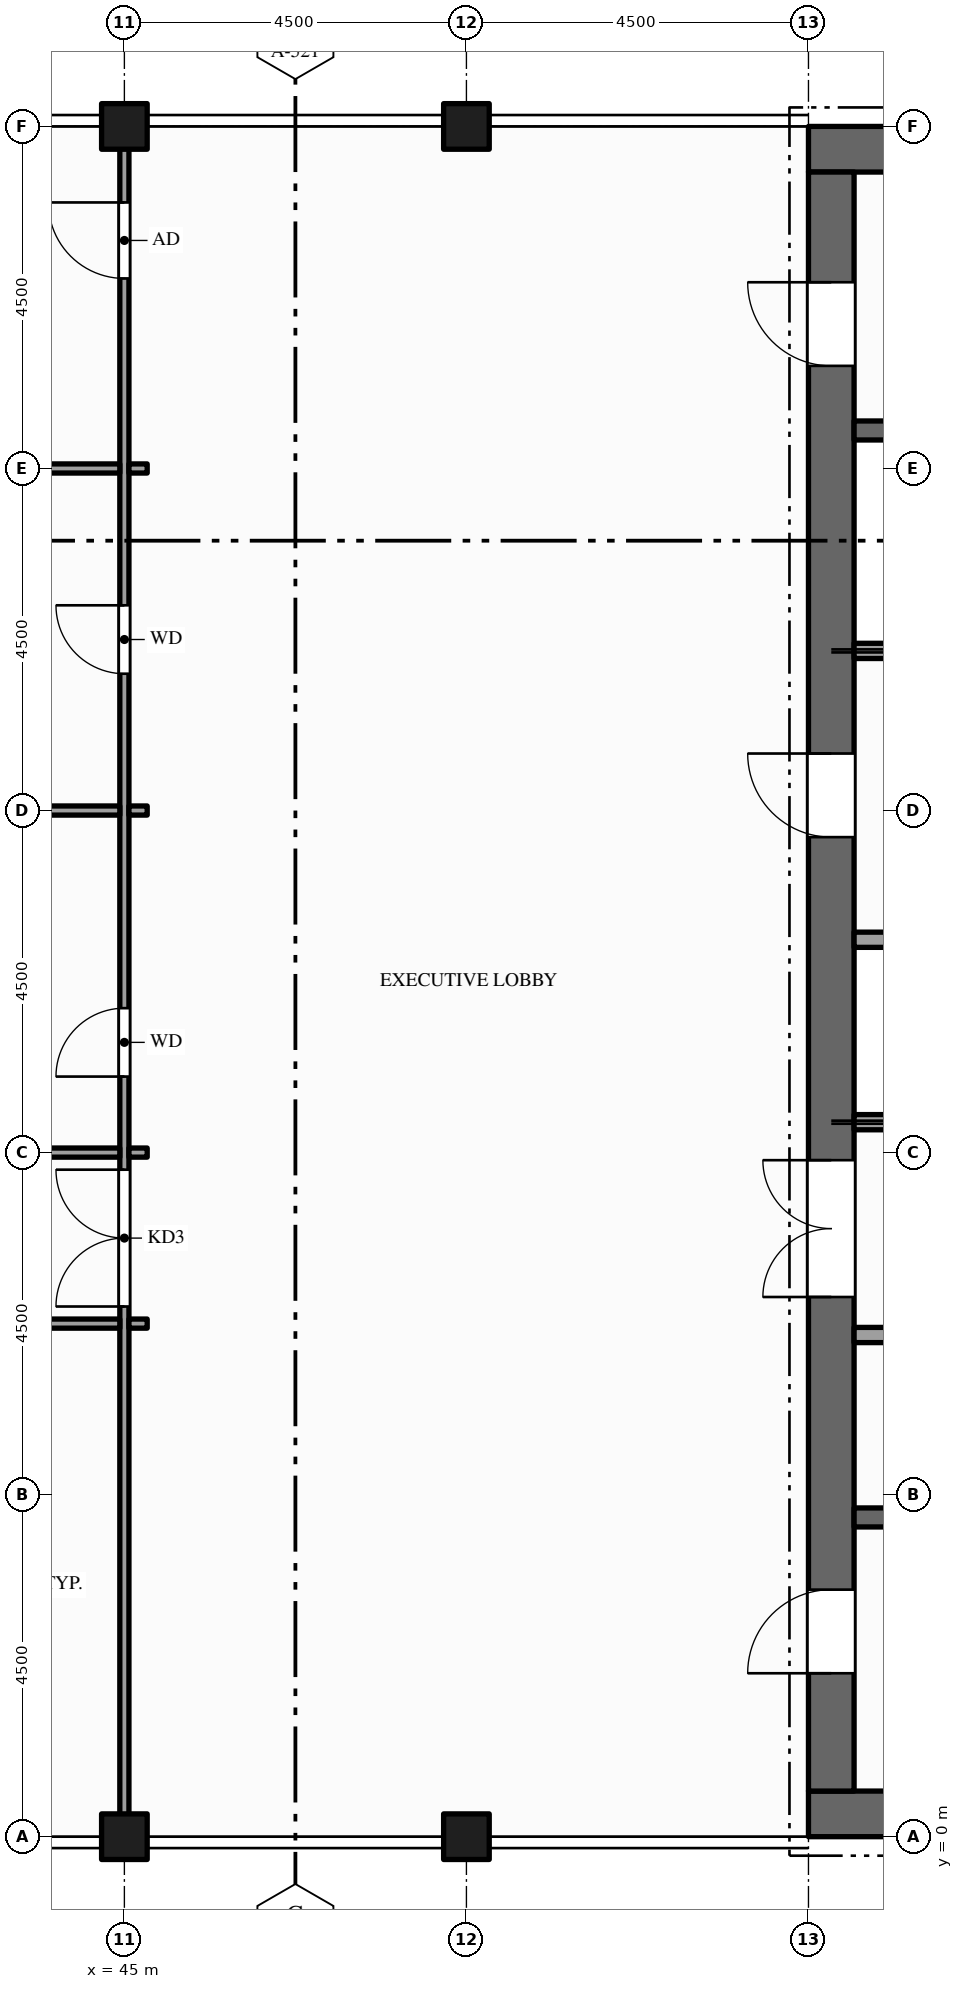
"""IFC4 building model, lengths in metres.
Left out: names, types, materials, properties, quantities, classifications, styles, units other than length and angle.
Written with IfcOpenShell. Run it as: python <this file> out.ifc"""

import sys

from ifc_helpers import new_model, si_unit, direction, frame, frame_2d, origin, origin_2d, place, context, subcontext, project, spatial, rectangle, hollow_rectangle, extrude, element, fill, save


model = new_model("IFC4")
c1 = context("Model", 3, precision=1e-05, world=origin(), true_north=direction((0.0, 1.0)))
c2 = subcontext(c1, "Body", "Model", "MODEL_VIEW")
j1 = project(units=[si_unit("LENGTHUNIT", "METRE"), si_unit("PLANEANGLEUNIT", "RADIAN")], contexts=[c1])
p1 = place(None, origin())
s1 = spatial("IfcSite", under=j1, at=p1, CompositionType="ELEMENT")
p2 = place(p1, origin())
s2 = spatial("IfcBuilding", under=s1, at=p2, CompositionType="ELEMENT")
p3 = place(p2, frame((0.0, 0.0, 336.5)))
s3 = spatial("IfcBuildingStorey", under=s2, at=p3, CompositionType="ELEMENT", Elevation=336.5)
for number, where, z_axis, x_axis in (
    (1, (67.5, 0.3, -0.15), (0.0, 0.0, 1.0), (-1.0, 0.0, 0.0)),
    (2, (54.0, 22.2, -0.15), (0.0, 0.0, 1.0), (1.0, 0.0, 0.0)),
):
    element("IfcWall", number, at=place(p3, frame(where, z_axis=z_axis, x_axis=x_axis)), inside=s3, PredefinedType="SHEAR", context=c2, shape_type="SweptSolid", body=[
        extrude(rectangle(XDim=13.5, YDim=0.6, at=frame_2d((6.75, 0.0))), origin(), (0.0, 0.0, 1.0), 4.5),
    ])
p4 = place(p3, frame((54.3, 0.6, -0.15), z_axis=(0.0, 0.0, 1.0), x_axis=(0.0, 1.0, 0.0)))
e3 = element("IfcWall", 3, at=p4, inside=s3, PredefinedType="SHEAR", context=c2, shape_type="SweptSolid", body=[
    extrude(rectangle(XDim=21.3, YDim=0.6, at=frame_2d((10.65, 0.0))), origin(), (0.0, 0.0, 1.0), 4.5),
])
p5 = place(p4, frame((6.5, 0.0, 0.15)))
e4 = element("IfcOpeningElement", 4, at=p5, cuts=e3, PredefinedType="OPENING", context=c2, shape_type="SweptSolid", body=[
    extrude(rectangle(XDim=1.8, YDim=2.1, at=frame_2d((0.9, 1.05))), frame((0.0, 0.31, 0.0), z_axis=(0.0, -1.0, 0.0), x_axis=(1.0, 0.0, 0.0)), (0.0, 0.0, 1.0), 0.62),
])
p6 = place(p4, frame((12.55, 0.0, 0.15)))
e5 = element("IfcOpeningElement", 5, at=p6, cuts=e3, PredefinedType="OPENING", context=c2, shape_type="SweptSolid", body=[
    extrude(rectangle(XDim=1.1, YDim=2.1, at=frame_2d((0.55, 1.05))), frame((0.0, 0.31, 0.0), z_axis=(0.0, -1.0, 0.0), x_axis=(1.0, 0.0, 0.0)), (0.0, 0.0, 1.0), 0.62),
])
p7 = place(p4, frame((1.55, 0.0, 0.15)))
e6 = element("IfcOpeningElement", 6, at=p7, cuts=e3, PredefinedType="OPENING", context=c2, shape_type="SweptSolid", body=[
    extrude(rectangle(XDim=1.1, YDim=2.1, at=frame_2d((0.55, 1.05))), frame((0.0, 0.31, 0.0), z_axis=(0.0, -1.0, 0.0), x_axis=(1.0, 0.0, 0.0)), (0.0, 0.0, 1.0), 0.62),
])
p8 = place(p4, frame((18.75, 0.0, 0.15)))
e7 = element("IfcOpeningElement", 7, at=p8, cuts=e3, PredefinedType="OPENING", context=c2, shape_type="SweptSolid", body=[
    extrude(rectangle(XDim=1.1, YDim=2.1, at=frame_2d((0.55, 1.05))), frame((0.0, 0.31, 0.0), z_axis=(0.0, -1.0, 0.0), x_axis=(1.0, 0.0, 0.0)), (0.0, 0.0, 1.0), 0.62),
])
for number, where, z_axis, x_axis in (
    (8, (45.0, 0.0, -0.15), (0.0, 0.0, 1.0), (1.0, 0.0, 0.0)),
    (9, (45.0, 22.5, -0.15), (0.0, 0.0, 1.0), (1.0, 0.0, 0.0)),
    (10, (49.5, 0.0, -0.15), (0.0, 0.0, 1.0), (1.0, 0.0, 0.0)),
    (11, (49.5, 22.5, -0.15), (0.0, 0.0, 1.0), (1.0, 0.0, 0.0)),
):
    element("IfcColumn", number, at=place(p3, frame(where, z_axis=z_axis, x_axis=x_axis)), inside=s3, PredefinedType="COLUMN", context=c2, shape_type="SweptSolid", body=[
        extrude(hollow_rectangle(XDim=0.6, YDim=0.6, WallThickness=0.03, at=origin_2d()), origin(), (0.0, 0.0, 1.0), 4.5),
    ])
p9 = place(p3, frame((45.0, 0.01, 0.0), z_axis=(0.0, 0.0, 1.0), x_axis=(0.0, 1.0, 0.0)))
e12 = element("IfcWall", 12, at=p9, inside=s3, PredefinedType="PARTITIONING", context=c2, shape_type="SweptSolid", body=[
    extrude(rectangle(XDim=22.48, YDim=0.12, at=frame_2d((11.24, 0.0))), origin(), (0.0, 0.0, 1.0), 3.359),
])
p10 = place(p9, frame((6.965, 0.0, 0.0)))
e13 = element("IfcOpeningElement", 13, at=p10, cuts=e12, PredefinedType="OPENING", context=c2, shape_type="SweptSolid", body=[
    extrude(rectangle(XDim=1.8, YDim=2.1, at=frame_2d((0.9, 1.05))), frame((0.0, 0.07, 0.0), z_axis=(0.0, -1.0, 0.0), x_axis=(1.0, 0.0, 0.0)), (0.0, 0.0, 1.0), 0.14),
])
p11 = place(p9, frame((9.99, 0.0, 0.0)))
e14 = element("IfcOpeningElement", 14, at=p11, cuts=e12, PredefinedType="OPENING", context=c2, shape_type="SweptSolid", body=[
    extrude(rectangle(XDim=0.9, YDim=2.1, at=frame_2d((0.45, 1.05))), frame((0.0, 0.07, 0.0), z_axis=(0.0, -1.0, 0.0), x_axis=(1.0, 0.0, 0.0)), (0.0, 0.0, 1.0), 0.14),
])
p12 = place(p9, frame((15.29, 0.0, 0.0)))
e15 = element("IfcOpeningElement", 15, at=p12, cuts=e12, PredefinedType="OPENING", context=c2, shape_type="SweptSolid", body=[
    extrude(rectangle(XDim=0.9, YDim=2.1, at=frame_2d((0.45, 1.05))), frame((0.0, 0.07, 0.0), z_axis=(0.0, -1.0, 0.0), x_axis=(1.0, 0.0, 0.0)), (0.0, 0.0, 1.0), 0.14),
])
p13 = place(p9, frame((20.49, 0.0, 0.0)))
e16 = element("IfcOpeningElement", 16, at=p13, cuts=e12, PredefinedType="OPENING", context=c2, shape_type="SweptSolid", body=[
    extrude(rectangle(XDim=1.0, YDim=2.1, at=frame_2d((0.5, 1.05))), frame((0.0, 0.07, 0.0), z_axis=(0.0, -1.0, 0.0), x_axis=(1.0, 0.0, 0.0)), (0.0, 0.0, 1.0), 0.14),
])
p14 = place(p3, frame((54.6, 4.2, 0.0), z_axis=(0.0, 0.0, 1.0), x_axis=(1.0, 0.0, 0.0)))
e17 = element("IfcWall", 17, at=p14, inside=s3, PredefinedType="SHEAR", context=c2, shape_type="SweptSolid", body=[
    extrude(rectangle(XDim=6.675, YDim=0.25, at=frame_2d((3.337, 0.0))), origin(), (0.0, 0.0, 1.0), 4.35),
])
p15 = place(p3, frame((54.6, 6.6, 0.0), z_axis=(0.0, 0.0, 1.0), x_axis=(1.0, 0.0, 0.0)))
e18 = element("IfcWall", 18, at=p15, inside=s3, PredefinedType="PARTITIONING", context=c2, shape_type="SweptSolid", body=[
    extrude(rectangle(XDim=9.25, YDim=0.2, at=frame_2d((4.625, 0.0))), origin(), (0.0, 0.0, 1.0), 4.35),
])
p16 = place(p15, frame((4.175, 0.0, 0.0)))
e19 = element("IfcOpeningElement", 19, at=p16, cuts=e18, PredefinedType="OPENING", context=c2, shape_type="SweptSolid", body=[
    extrude(rectangle(XDim=0.9, YDim=2.1, at=frame_2d((0.45, 1.05))), frame((0.0, 0.11, 0.0), z_axis=(0.0, -1.0, 0.0), x_axis=(1.0, 0.0, 0.0)), (0.0, 0.0, 1.0), 0.22),
])
p17 = place(p3, frame((36.06, 6.75, 0.0), z_axis=(0.0, 0.0, 1.0), x_axis=(1.0, 0.0, 0.0)))
e20 = element("IfcWall", 20, at=p17, inside=s3, PredefinedType="PARTITIONING", context=c2, shape_type="SweptSolid", body=[
    extrude(rectangle(XDim=8.88, YDim=0.12, at=frame_2d((4.44, 0.0))), origin(), (0.0, 0.0, 1.0), 3.359),
])
p18 = place(p17, frame((3.94, 0.0, 0.0)))
e21 = element("IfcOpeningElement", 21, at=p18, cuts=e20, PredefinedType="OPENING", context=c2, shape_type="SweptSolid", body=[
    extrude(rectangle(XDim=1.0, YDim=2.1, at=frame_2d((0.5, 1.05))), frame((0.0, 0.07, 0.0), z_axis=(0.0, -1.0, 0.0), x_axis=(1.0, 0.0, 0.0)), (0.0, 0.0, 1.0), 0.14),
])
p19 = place(p3, frame((45.06, 6.75, 0.0), z_axis=(0.0, 0.0, 1.0), x_axis=(1.0, 0.0, 0.0)))
e22 = element("IfcWall", 22, at=p19, inside=s3, PredefinedType="PARTITIONING", context=c2, shape_type="SweptSolid", body=[
    extrude(rectangle(XDim=0.24, YDim=0.12, at=frame_2d((0.12, 0.0))), origin(), (0.0, 0.0, 1.0), 3.359),
])
p20 = place(p3, frame((40.56, 9.0, 0.0), z_axis=(0.0, 0.0, 1.0), x_axis=(1.0, 0.0, 0.0)))
e23 = element("IfcWall", 23, at=p20, inside=s3, PredefinedType="PARTITIONING", context=c2, shape_type="SweptSolid", body=[
    extrude(rectangle(XDim=4.38, YDim=0.12, at=frame_2d((2.19, 0.0))), origin(), (0.0, 0.0, 1.0), 3.359),
])
p21 = place(p3, frame((45.06, 9.0, 0.0), z_axis=(0.0, 0.0, 1.0), x_axis=(1.0, 0.0, 0.0)))
e24 = element("IfcWall", 24, at=p21, inside=s3, PredefinedType="PARTITIONING", context=c2, shape_type="SweptSolid", body=[
    extrude(rectangle(XDim=0.24, YDim=0.12, at=frame_2d((0.12, 0.0))), origin(), (0.0, 0.0, 1.0), 3.359),
])
p22 = place(p3, frame((54.6, 9.4, 0.0), z_axis=(0.0, 0.0, 1.0), x_axis=(1.0, 0.0, 0.0)))
e25 = element("IfcWall", 25, at=p22, inside=s3, PredefinedType="SOLIDWALL", context=c2, shape_type="SweptSolid", body=[
    extrude(rectangle(XDim=2.7, YDim=0.2, at=frame_2d((1.35, 0.0))), origin(), (0.0, 0.0, 1.0), 4.35),
])
p23 = place(p22, frame((0.8, 0.0, 0.012)))
e26 = element("IfcOpeningElement", 26, at=p23, cuts=e25, PredefinedType="OPENING", context=c2, shape_type="SweptSolid", body=[
    extrude(rectangle(XDim=1.1, YDim=2.1, at=frame_2d((0.55, 1.05))), frame((0.0, 0.11, 0.0), z_axis=(0.0, -1.0, 0.0), x_axis=(1.0, 0.0, 0.0)), (0.0, 0.0, 1.0), 0.22),
])
p24 = place(p3, frame((54.6, 11.8, 0.0), z_axis=(0.0, 0.0, 1.0), x_axis=(1.0, 0.0, 0.0)))
e27 = element("IfcWall", 27, at=p24, inside=s3, PredefinedType="SOLIDWALL", context=c2, shape_type="SweptSolid", body=[
    extrude(rectangle(XDim=2.7, YDim=0.2, at=frame_2d((1.35, 0.0))), origin(), (0.0, 0.0, 1.0), 4.35),
])
p25 = place(p3, frame((40.56, 13.5, 0.0), z_axis=(0.0, 0.0, 1.0), x_axis=(1.0, 0.0, 0.0)))
e28 = element("IfcWall", 28, at=p25, inside=s3, PredefinedType="PARTITIONING", context=c2, shape_type="SweptSolid", body=[
    extrude(rectangle(XDim=4.38, YDim=0.12, at=frame_2d((2.19, 0.0))), origin(), (0.0, 0.0, 1.0), 3.359),
])
p26 = place(p3, frame((45.06, 13.5, 0.0), z_axis=(0.0, 0.0, 1.0), x_axis=(1.0, 0.0, 0.0)))
e29 = element("IfcWall", 29, at=p26, inside=s3, PredefinedType="PARTITIONING", context=c2, shape_type="SweptSolid", body=[
    extrude(rectangle(XDim=0.24, YDim=0.12, at=frame_2d((0.12, 0.0))), origin(), (0.0, 0.0, 1.0), 3.359),
])
p27 = place(p3, frame((54.6, 15.6, 0.0), z_axis=(0.0, 0.0, 1.0), x_axis=(1.0, 0.0, 0.0)))
e30 = element("IfcWall", 30, at=p27, inside=s3, PredefinedType="SOLIDWALL", context=c2, shape_type="SweptSolid", body=[
    extrude(rectangle(XDim=2.7, YDim=0.2, at=frame_2d((1.35, 0.0))), origin(), (0.0, 0.0, 1.0), 4.35),
])
p28 = place(p27, frame((0.8, 0.0, 0.012)))
e31 = element("IfcOpeningElement", 31, at=p28, cuts=e30, PredefinedType="OPENING", context=c2, shape_type="SweptSolid", body=[
    extrude(rectangle(XDim=1.1, YDim=2.1, at=frame_2d((0.55, 1.05))), frame((0.0, 0.11, 0.0), z_axis=(0.0, -1.0, 0.0), x_axis=(1.0, 0.0, 0.0)), (0.0, 0.0, 1.0), 0.22),
])
p29 = place(p3, frame((40.56, 18.0, 0.0), z_axis=(0.0, 0.0, 1.0), x_axis=(1.0, 0.0, 0.0)))
e32 = element("IfcWall", 32, at=p29, inside=s3, PredefinedType="PARTITIONING", context=c2, shape_type="SweptSolid", body=[
    extrude(rectangle(XDim=4.38, YDim=0.12, at=frame_2d((2.19, 0.0))), origin(), (0.0, 0.0, 1.0), 3.359),
])
p30 = place(p3, frame((45.06, 18.0, 0.0), z_axis=(0.0, 0.0, 1.0), x_axis=(1.0, 0.0, 0.0)))
e33 = element("IfcWall", 33, at=p30, inside=s3, PredefinedType="PARTITIONING", context=c2, shape_type="SweptSolid", body=[
    extrude(rectangle(XDim=0.24, YDim=0.12, at=frame_2d((0.12, 0.0))), origin(), (0.0, 0.0, 1.0), 3.359),
])
p31 = place(p3, frame((54.6, 18.5, 0.0), z_axis=(0.0, 0.0, 1.0), x_axis=(1.0, 0.0, 0.0)))
e34 = element("IfcWall", 34, at=p31, inside=s3, PredefinedType="SHEAR", context=c2, shape_type="SweptSolid", body=[
    extrude(rectangle(XDim=6.675, YDim=0.25, at=frame_2d((3.337, 0.0))), origin(), (0.0, 0.0, 1.0), 4.35),
])
p32 = place(p5, origin())
e35 = element("IfcDoor", 35, at=p32, inside=s3, OperationType="DOUBLE_DOOR_SINGLE_SWING", PredefinedType="DOOR", context=c2, shape_type="SweptSolid", body=[
    extrude(rectangle(XDim=1.8, YDim=2.1, at=frame_2d((0.9, 1.05))), frame((0.0, 0.025, 0.0), z_axis=(0.0, -1.0, 0.0), x_axis=(1.0, 0.0, 0.0)), (0.0, 0.0, 1.0), 0.05),
])
fill(e4, e35)
p33 = place(p6, origin())
e36 = element("IfcDoor", 36, at=p33, inside=s3, OperationType="SINGLE_SWING_RIGHT", PredefinedType="DOOR", context=c2, shape_type="SweptSolid", body=[
    extrude(rectangle(XDim=1.1, YDim=2.1, at=frame_2d((0.55, 1.05))), frame((0.0, 0.025, 0.0), z_axis=(0.0, -1.0, 0.0), x_axis=(1.0, 0.0, 0.0)), (0.0, 0.0, 1.0), 0.05),
])
fill(e5, e36)
p34 = place(p7, origin())
e37 = element("IfcDoor", 37, at=p34, inside=s3, OperationType="SINGLE_SWING_LEFT", PredefinedType="DOOR", context=c2, shape_type="SweptSolid", body=[
    extrude(rectangle(XDim=1.1, YDim=2.1, at=frame_2d((0.55, 1.05))), frame((0.0, 0.025, 0.0), z_axis=(0.0, -1.0, 0.0), x_axis=(1.0, 0.0, 0.0)), (0.0, 0.0, 1.0), 0.05),
])
fill(e6, e37)
p35 = place(p8, origin())
e38 = element("IfcDoor", 38, at=p35, inside=s3, OperationType="SINGLE_SWING_RIGHT", PredefinedType="DOOR", context=c2, shape_type="SweptSolid", body=[
    extrude(rectangle(XDim=1.1, YDim=2.1, at=frame_2d((0.55, 1.05))), frame((0.0, 0.025, 0.0), z_axis=(0.0, -1.0, 0.0), x_axis=(1.0, 0.0, 0.0)), (0.0, 0.0, 1.0), 0.05),
])
fill(e7, e38)
p36 = place(p10, origin())
e39 = element("IfcDoor", 39, at=p36, inside=s3, OperationType="DOUBLE_DOOR_SINGLE_SWING", PredefinedType="DOOR", context=c2, shape_type="SweptSolid", body=[
    extrude(rectangle(XDim=1.8, YDim=2.1, at=frame_2d((0.9, 1.05))), frame((0.0, 0.025, 0.0), z_axis=(0.0, -1.0, 0.0), x_axis=(1.0, 0.0, 0.0)), (0.0, 0.0, 1.0), 0.05),
])
fill(e13, e39)
p37 = place(p11, origin())
e40 = element("IfcDoor", 40, at=p37, inside=s3, OperationType="SINGLE_SWING_LEFT", PredefinedType="DOOR", context=c2, shape_type="SweptSolid", body=[
    extrude(rectangle(XDim=0.9, YDim=2.1, at=frame_2d((0.45, 1.05))), frame((0.0, 0.025, 0.0), z_axis=(0.0, -1.0, 0.0), x_axis=(1.0, 0.0, 0.0)), (0.0, 0.0, 1.0), 0.05),
])
fill(e14, e40)
p38 = place(p12, origin())
e41 = element("IfcDoor", 41, at=p38, inside=s3, OperationType="SINGLE_SWING_RIGHT", PredefinedType="DOOR", context=c2, shape_type="SweptSolid", body=[
    extrude(rectangle(XDim=0.9, YDim=2.1, at=frame_2d((0.45, 1.05))), frame((0.0, 0.025, 0.0), z_axis=(0.0, -1.0, 0.0), x_axis=(1.0, 0.0, 0.0)), (0.0, 0.0, 1.0), 0.05),
])
fill(e15, e41)
p39 = place(p13, origin())
e42 = element("IfcDoor", 42, at=p39, inside=s3, OperationType="SINGLE_SWING_RIGHT", PredefinedType="DOOR", context=c2, shape_type="SweptSolid", body=[
    extrude(rectangle(XDim=1.0, YDim=2.1, at=frame_2d((0.5, 1.05))), frame((0.0, 0.025, 0.0), z_axis=(0.0, -1.0, 0.0), x_axis=(1.0, 0.0, 0.0)), (0.0, 0.0, 1.0), 0.05),
])
fill(e16, e42)
save(model, sys.argv[1])
